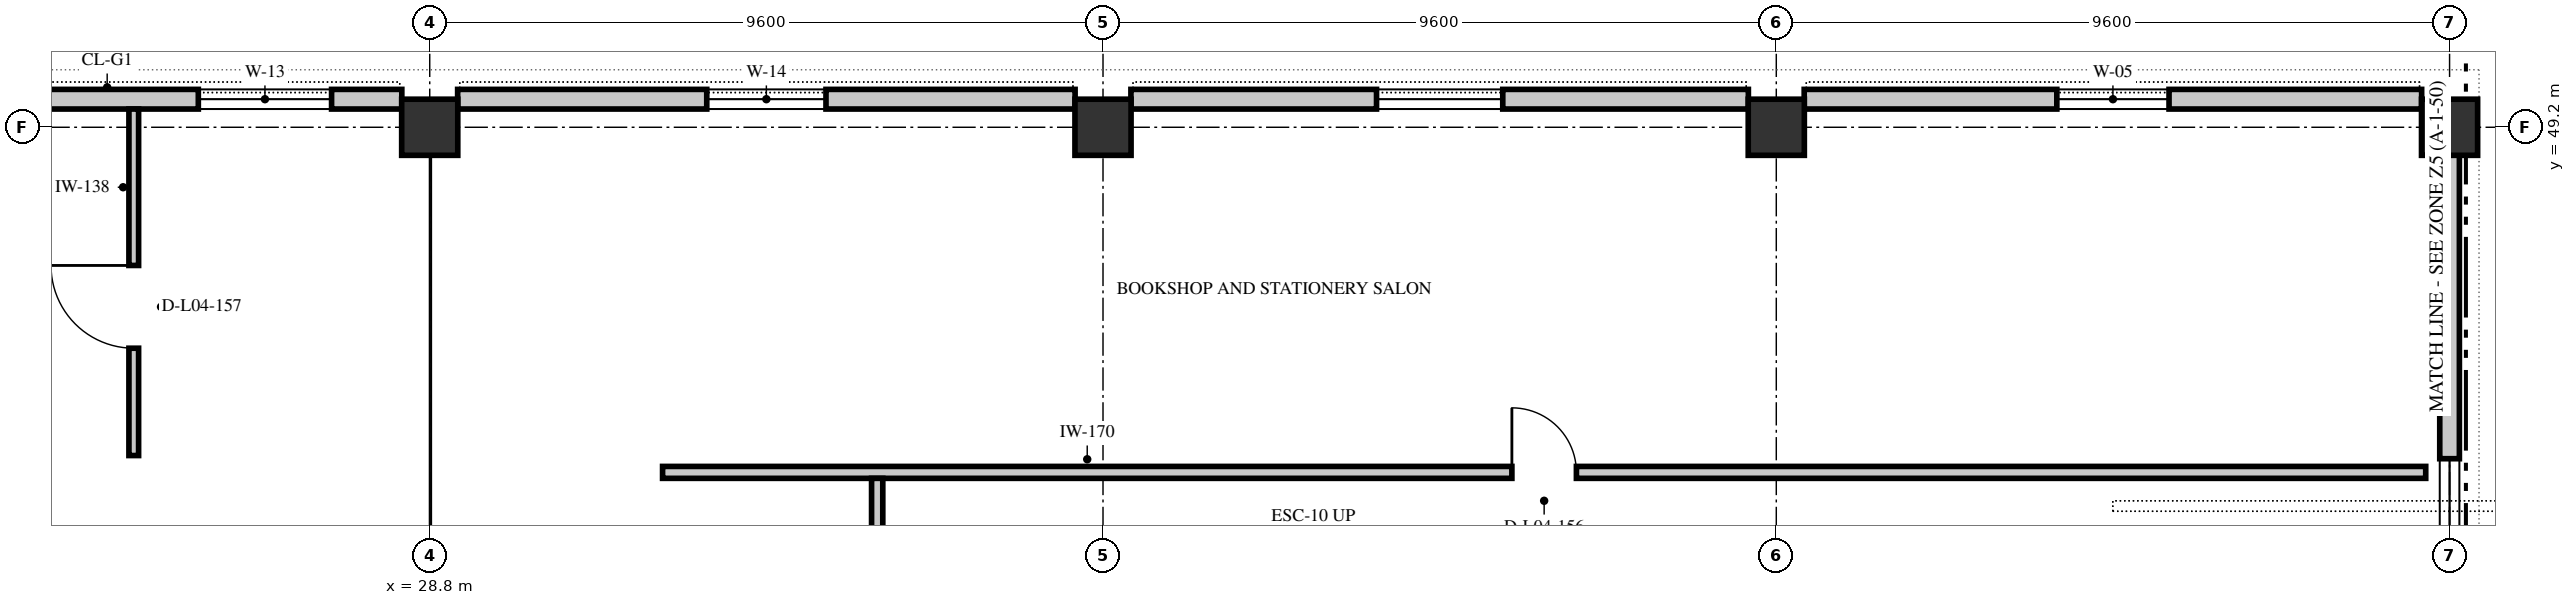
"""IFC4 building model, lengths in metres.
Left out: names, types, materials, properties, quantities, classifications, styles, units other than length and angle.
Written with IfcOpenShell. Run it as: python <this file> out.ifc"""

import sys

from ifc_helpers import new_model, si_unit, direction, frame, frame_2d, origin, origin_2d, place, context, subcontext, project, spatial, rectangle, extrude, element, fill, save


model = new_model("IFC4")
c1 = context("Model", 3, precision=1e-05, world=origin(), true_north=direction((0.0, 1.0)))
c2 = subcontext(c1, "Body", "Model", "MODEL_VIEW")
j1 = project(units=[si_unit("LENGTHUNIT", "METRE"), si_unit("PLANEANGLEUNIT", "RADIAN")], contexts=[c1])
p1 = place(None, origin())
s1 = spatial("IfcSite", under=j1, at=p1, CompositionType="ELEMENT")
p2 = place(p1, origin())
s2 = spatial("IfcBuilding", under=s1, at=p2, CompositionType="ELEMENT")
p3 = place(p2, frame((0.0, 0.0, 19.8)))
s3 = spatial("IfcBuildingStorey", under=s2, at=p3, CompositionType="ELEMENT", Elevation=19.8)
for number, where, z_axis, x_axis in (
    (1, (28.8, 49.2, 0.0), (0.0, 0.0, 1.0), (1.0, 0.0, 0.0)),
    (2, (38.4, 49.2, 0.0), (0.0, 0.0, 1.0), (1.0, 0.0, 0.0)),
    (3, (48.0, 49.2, 0.0), (0.0, 0.0, 1.0), (1.0, 0.0, 0.0)),
    (4, (57.6, 49.2, 0.0), (0.0, 0.0, 1.0), (1.0, 0.0, 0.0)),
):
    element("IfcColumn", number, at=place(p3, frame(where, z_axis=z_axis, x_axis=x_axis)), inside=s3, PredefinedType="COLUMN", context=c2, shape_type="SweptSolid", body=[
        extrude(rectangle(XDim=0.8, YDim=0.8, at=origin_2d()), origin(), (0.0, 0.0, 1.0), 4.8),
    ])
p4 = place(p3, frame((20.0, 49.6, 0.0), z_axis=(0.0, 0.0, 1.0), x_axis=(1.0, 0.0, 0.0)))
e5 = element("IfcWall", 5, at=p4, inside=s3, PredefinedType="SOLIDWALL", context=c2, shape_type="SweptSolid", body=[
    extrude(rectangle(XDim=8.402, YDim=0.28, at=frame_2d((4.201, 0.0))), origin(), (0.0, 0.0, 1.0), 3.42),
])
p5 = place(p4, frame((5.5, 0.0, 1.1)))
e6 = element("IfcOpeningElement", 6, at=p5, cuts=e5, PredefinedType="OPENING", context=c2, shape_type="SweptSolid", body=[
    extrude(rectangle(XDim=1.9, YDim=1.85, at=frame_2d((0.95, 0.925))), frame((0.0, 0.152, 0.0), z_axis=(0.0, -1.0, 0.0), x_axis=(1.0, 0.0, 0.0)), (0.0, 0.0, 1.0), 0.304),
])
p6 = place(p3, frame((29.198, 49.6, 0.0), z_axis=(0.0, 0.0, 1.0), x_axis=(1.0, 0.0, 0.0)))
e7 = element("IfcWall", 7, at=p6, inside=s3, PredefinedType="SOLIDWALL", context=c2, shape_type="SweptSolid", body=[
    extrude(rectangle(XDim=8.804, YDim=0.28, at=frame_2d((4.402, 0.0))), origin(), (0.0, 0.0, 1.0), 3.42),
])
p7 = place(p6, frame((3.552, 0.0, 1.1)))
e8 = element("IfcOpeningElement", 8, at=p7, cuts=e7, PredefinedType="OPENING", context=c2, shape_type="SweptSolid", body=[
    extrude(rectangle(XDim=1.7, YDim=1.8, at=frame_2d((0.85, 0.9))), frame((0.0, 0.152, 0.0), z_axis=(0.0, -1.0, 0.0), x_axis=(1.0, 0.0, 0.0)), (0.0, 0.0, 1.0), 0.304),
])
p8 = place(p3, frame((38.798, 49.6, 0.0), z_axis=(0.0, 0.0, 1.0), x_axis=(1.0, 0.0, 0.0)))
e9 = element("IfcWall", 9, at=p8, inside=s3, PredefinedType="SOLIDWALL", context=c2, shape_type="SweptSolid", body=[
    extrude(rectangle(XDim=8.804, YDim=0.28, at=frame_2d((4.402, 0.0))), origin(), (0.0, 0.0, 1.0), 3.42),
])
p9 = place(p8, frame((3.502, 0.0, 1.2)))
e10 = element("IfcOpeningElement", 10, at=p9, cuts=e9, PredefinedType="OPENING", context=c2, shape_type="SweptSolid", body=[
    extrude(rectangle(XDim=1.8, YDim=1.5, at=frame_2d((0.9, 0.75))), frame((0.0, 0.152, 0.0), z_axis=(0.0, -1.0, 0.0), x_axis=(1.0, 0.0, 0.0)), (0.0, 0.0, 1.0), 0.304),
])
p10 = place(p3, frame((48.398, 49.6, 0.0), z_axis=(0.0, 0.0, 1.0), x_axis=(1.0, 0.0, 0.0)))
e11 = element("IfcWall", 11, at=p10, inside=s3, PredefinedType="SOLIDWALL", context=c2, shape_type="SweptSolid", body=[
    extrude(rectangle(XDim=8.804, YDim=0.28, at=frame_2d((4.402, 0.0))), origin(), (0.0, 0.0, 1.0), 4.48),
])
p11 = place(p10, frame((3.602, 0.0, 1.0)))
e12 = element("IfcOpeningElement", 12, at=p11, cuts=e11, PredefinedType="OPENING", context=c2, shape_type="SweptSolid", body=[
    extrude(rectangle(XDim=1.6, YDim=2.1, at=frame_2d((0.8, 1.05))), frame((0.0, 0.152, 0.0), z_axis=(0.0, -1.0, 0.0), x_axis=(1.0, 0.0, 0.0)), (0.0, 0.0, 1.0), 0.304),
])
p12 = place(p3, frame((57.6, 48.802, 0.0), z_axis=(0.0, 0.0, 1.0), x_axis=(0.0, -1.0, 0.0)))
e13 = element("IfcWall", 13, at=p12, inside=s3, PredefinedType="SOLIDWALL", context=c2, shape_type="SweptSolid", body=[
    extrude(rectangle(XDim=10.004, YDim=0.28, at=frame_2d((5.002, 0.0))), origin(), (0.0, 0.0, 1.0), 3.42),
])
p13 = place(p12, frame((4.327, 0.0, 1.25)))
e14 = element("IfcOpeningElement", 14, at=p13, cuts=e13, PredefinedType="OPENING", context=c2, shape_type="SweptSolid", body=[
    extrude(rectangle(XDim=1.35, YDim=1.4, at=frame_2d((0.675, 0.7))), frame((0.0, 0.152, 0.0), z_axis=(0.0, -1.0, 0.0), x_axis=(1.0, 0.0, 0.0)), (0.0, 0.0, 1.0), 0.304),
])
p14 = place(p3, frame((32.12, 44.28, 0.0), z_axis=(0.0, 0.0, 1.0), x_axis=(1.0, 0.0, 0.0)))
e15 = element("IfcWall", 15, at=p14, inside=s3, PredefinedType="PARTITIONING", context=c2, shape_type="SweptSolid", body=[
    extrude(rectangle(XDim=25.14, YDim=0.17, at=frame_2d((12.57, 0.0))), origin(), (0.0, 0.0, 1.0), 3.42),
])
p15 = place(p14, frame((12.11, 0.0, 0.0)))
e16 = element("IfcOpeningElement", 16, at=p15, cuts=e15, PredefinedType="OPENING", context=c2, shape_type="SweptSolid", body=[
    extrude(rectangle(XDim=0.92, YDim=2.1, at=frame_2d((0.46, 1.05))), frame((0.0, 0.097, 0.0), z_axis=(0.0, -1.0, 0.0), x_axis=(1.0, 0.0, 0.0)), (0.0, 0.0, 1.0), 0.194),
])
p16 = place(p3, frame((35.18, 39.24, 0.0), z_axis=(0.0, 0.0, 1.0), x_axis=(0.0, 1.0, 0.0)))
e17 = element("IfcWall", 17, at=p16, inside=s3, PredefinedType="PARTITIONING", context=c2, shape_type="SweptSolid", body=[
    extrude(rectangle(XDim=4.955, YDim=0.16, at=frame_2d((2.478, 0.0))), origin(), (0.0, 0.0, 1.0), 4.48),
])
p17 = place(p3, frame((24.58, 44.52, 0.0), z_axis=(0.0, 0.0, 1.0), x_axis=(0.0, 1.0, 0.0)))
e18 = element("IfcWall", 18, at=p17, inside=s3, PredefinedType="PARTITIONING", context=c2, shape_type="SweptSolid", body=[
    extrude(rectangle(XDim=4.94, YDim=0.138, at=frame_2d((2.47, 0.0))), origin(), (0.0, 0.0, 1.0), 3.42),
])
p18 = place(p17, frame((1.53, 0.0, 0.0)))
e19 = element("IfcOpeningElement", 19, at=p18, cuts=e18, PredefinedType="OPENING", context=c2, shape_type="SweptSolid", body=[
    extrude(rectangle(XDim=1.18, YDim=2.22, at=frame_2d((0.59, 1.11))), frame((0.0, 0.081, 0.0), z_axis=(0.0, -1.0, 0.0), x_axis=(1.0, 0.0, 0.0)), (0.0, 0.0, 1.0), 0.162),
])
p19 = place(p5, origin())
e20 = element("IfcWindow", 20, at=p19, inside=s3, PartitioningType="SINGLE_PANEL", PredefinedType="WINDOW", context=c2, shape_type="SweptSolid", body=[
    extrude(rectangle(XDim=1.9, YDim=1.85, at=frame_2d((0.95, 0.925))), frame((0.0, 0.03, 0.0), z_axis=(0.0, -1.0, 0.0), x_axis=(1.0, 0.0, 0.0)), (0.0, 0.0, 1.0), 0.06),
])
fill(e6, e20)
p20 = place(p7, origin())
e21 = element("IfcWindow", 21, at=p20, inside=s3, PartitioningType="SINGLE_PANEL", PredefinedType="WINDOW", context=c2, shape_type="SweptSolid", body=[
    extrude(rectangle(XDim=1.7, YDim=1.8, at=frame_2d((0.85, 0.9))), frame((0.0, 0.03, 0.0), z_axis=(0.0, -1.0, 0.0), x_axis=(1.0, 0.0, 0.0)), (0.0, 0.0, 1.0), 0.06),
])
fill(e8, e21)
p21 = place(p9, origin())
e22 = element("IfcWindow", 22, at=p21, inside=s3, PartitioningType="SINGLE_PANEL", PredefinedType="WINDOW", context=c2, shape_type="SweptSolid", body=[
    extrude(rectangle(XDim=1.8, YDim=1.5, at=frame_2d((0.9, 0.75))), frame((0.0, 0.03, 0.0), z_axis=(0.0, -1.0, 0.0), x_axis=(1.0, 0.0, 0.0)), (0.0, 0.0, 1.0), 0.06),
])
fill(e10, e22)
p22 = place(p11, origin())
e23 = element("IfcWindow", 23, at=p22, inside=s3, PartitioningType="SINGLE_PANEL", PredefinedType="WINDOW", context=c2, shape_type="SweptSolid", body=[
    extrude(rectangle(XDim=1.6, YDim=2.1, at=frame_2d((0.8, 1.05))), frame((0.0, 0.03, 0.0), z_axis=(0.0, -1.0, 0.0), x_axis=(1.0, 0.0, 0.0)), (0.0, 0.0, 1.0), 0.06),
])
fill(e12, e23)
p23 = place(p13, origin())
e24 = element("IfcWindow", 24, at=p23, inside=s3, PartitioningType="SINGLE_PANEL", PredefinedType="WINDOW", context=c2, shape_type="SweptSolid", body=[
    extrude(rectangle(XDim=1.35, YDim=1.4, at=frame_2d((0.675, 0.7))), frame((0.0, 0.03, 0.0), z_axis=(0.0, -1.0, 0.0), x_axis=(1.0, 0.0, 0.0)), (0.0, 0.0, 1.0), 0.06),
])
fill(e14, e24)
p24 = place(p15, origin())
e25 = element("IfcDoor", 25, at=p24, inside=s3, OperationType="SINGLE_SWING_LEFT", PredefinedType="DOOR", context=c2, shape_type="SweptSolid", body=[
    extrude(rectangle(XDim=0.92, YDim=2.1, at=frame_2d((0.46, 1.05))), frame((0.0, 0.025, 0.0), z_axis=(0.0, -1.0, 0.0), x_axis=(1.0, 0.0, 0.0)), (0.0, 0.0, 1.0), 0.05),
])
fill(e16, e25)
p25 = place(p18, origin())
e26 = element("IfcDoor", 26, at=p25, inside=s3, OperationType="SINGLE_SWING_RIGHT", PredefinedType="DOOR", context=c2, shape_type="SweptSolid", body=[
    extrude(rectangle(XDim=1.18, YDim=2.22, at=frame_2d((0.59, 1.11))), frame((0.0, 0.025, 0.0), z_axis=(0.0, -1.0, 0.0), x_axis=(1.0, 0.0, 0.0)), (0.0, 0.0, 1.0), 0.05),
])
fill(e19, e26)
save(model, sys.argv[1])
